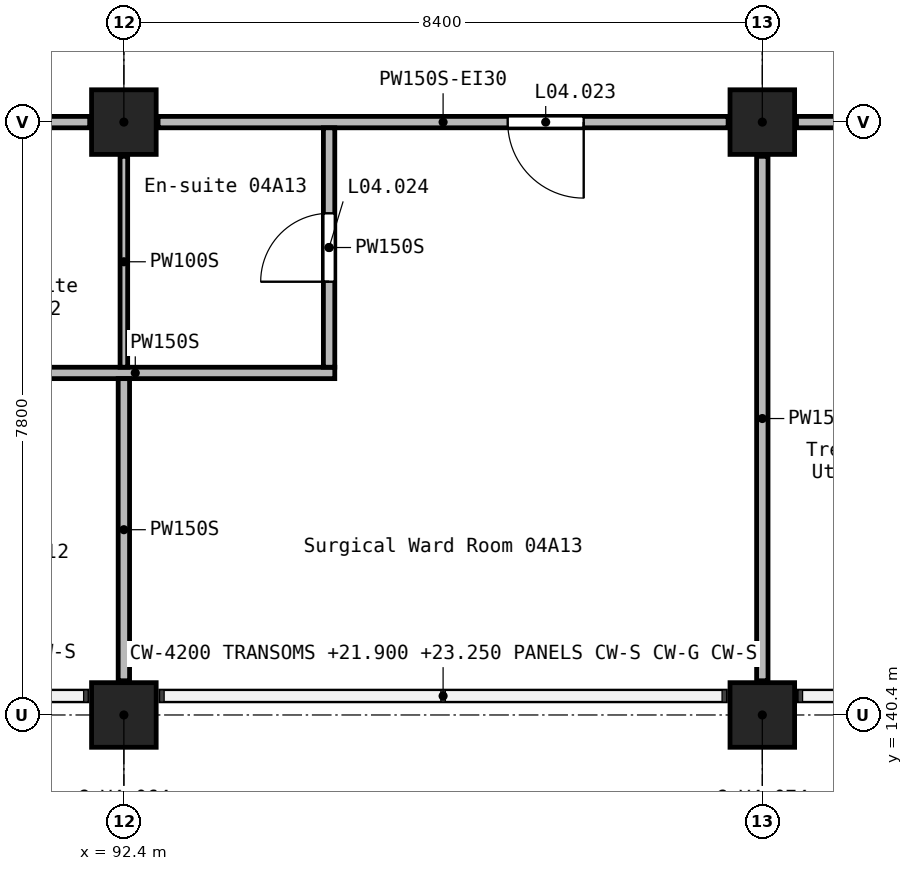
"""IFC4 building model, lengths in metres.
Left out: names, types, materials, properties, quantities, classifications, styles, units other than length and angle.
Written with IfcOpenShell. Run it as: python <this file> out.ifc"""

import sys

from ifc_helpers import new_model, si_unit, direction, frame, frame_2d, origin, origin_2d, place, context, subcontext, project, spatial, rectangle, extrude, element, fill, save


model = new_model("IFC4")
c1 = context("Model", 3, precision=1e-05, world=origin(), true_north=direction((0.0, 1.0)))
c2 = subcontext(c1, "Body", "Model", "MODEL_VIEW")
j1 = project(units=[si_unit("LENGTHUNIT", "METRE"), si_unit("PLANEANGLEUNIT", "RADIAN")], contexts=[c1])
p1 = place(None, origin())
s1 = spatial("IfcSite", under=j1, at=p1, CompositionType="ELEMENT")
p2 = place(p1, origin())
s2 = spatial("IfcBuilding", under=s1, at=p2, CompositionType="ELEMENT")
p3 = place(p2, frame((0.0, 0.0, 21.0)))
s3 = spatial("IfcBuildingStorey", under=s2, at=p3, CompositionType="ELEMENT", Elevation=21.0)
for number, where, z_axis, x_axis in (
    (1, (92.4, 140.4, 0.0), (0.0, 0.0, 1.0), (1.0, 0.0, 0.0)),
    (2, (92.4, 148.2, 0.0), (0.0, 0.0, 1.0), (1.0, 0.0, 0.0)),
    (3, (100.8, 140.4, 0.0), (0.0, 0.0, 1.0), (1.0, 0.0, 0.0)),
    (4, (100.8, 148.2, 0.0), (0.0, 0.0, 1.0), (1.0, 0.0, 0.0)),
):
    element("IfcColumn", number, at=place(p3, frame(where, z_axis=z_axis, x_axis=x_axis)), inside=s3, PredefinedType="COLUMN", context=c2, shape_type="SweptSolid", body=[
        extrude(rectangle(XDim=0.85, YDim=0.85, at=origin_2d()), origin(), (0.0, 0.0, 1.0), 3.9),
    ])
p4 = place(p3, frame((100.35, 148.2, 0.0), z_axis=(0.0, 0.0, 1.0), x_axis=(-1.0, 0.0, 0.0)))
e5 = element("IfcWall", 5, at=p4, inside=s3, PredefinedType="PARTITIONING", context=c2, shape_type="SweptSolid", body=[
    extrude(rectangle(XDim=7.5, YDim=0.15, at=frame_2d((3.75, 0.0))), origin(), (0.0, 0.0, 1.0), 3.6),
])
p5 = place(p4, frame((1.9, 0.0, 0.0)))
e6 = element("IfcOpeningElement", 6, at=p5, cuts=e5, PredefinedType="OPENING", context=c2, shape_type="SweptSolid", body=[
    extrude(rectangle(XDim=1.0, YDim=2.1, at=frame_2d((0.5, 1.05))), frame((0.0, 0.085, 0.0), z_axis=(0.0, -1.0, 0.0), x_axis=(1.0, 0.0, 0.0)), (0.0, 0.0, 1.0), 0.17),
])
p6 = place(p3, frame((91.95, 148.2, 0.0), z_axis=(0.0, 0.0, 1.0), x_axis=(-1.0, 0.0, 0.0)))
e7 = element("IfcWall", 7, at=p6, inside=s3, PredefinedType="PARTITIONING", context=c2, shape_type="SweptSolid", body=[
    extrude(rectangle(XDim=7.5, YDim=0.15, at=frame_2d((3.75, 0.0))), origin(), (0.0, 0.0, 1.0), 3.6),
])
p7 = place(p6, frame((5.6, 0.0, 0.0)))
e8 = element("IfcOpeningElement", 8, at=p7, cuts=e7, PredefinedType="OPENING", context=c2, shape_type="SweptSolid", body=[
    extrude(rectangle(XDim=1.8, YDim=2.1, at=frame_2d((0.9, 1.05))), frame((0.0, 0.085, 0.0), z_axis=(0.0, -1.0, 0.0), x_axis=(1.0, 0.0, 0.0)), (0.0, 0.0, 1.0), 0.17),
])
p8 = place(p6, frame((2.35, 0.0, 0.0)))
e9 = element("IfcOpeningElement", 9, at=p8, cuts=e7, PredefinedType="OPENING", context=c2, shape_type="SweptSolid", body=[
    extrude(rectangle(XDim=1.0, YDim=2.1, at=frame_2d((0.5, 1.05))), frame((0.0, 0.085, 0.0), z_axis=(0.0, -1.0, 0.0), x_axis=(1.0, 0.0, 0.0)), (0.0, 0.0, 1.0), 0.17),
])
p9 = place(p3, frame((101.25, 148.2, 0.0), z_axis=(0.0, 0.0, 1.0), x_axis=(1.0, 0.0, 0.0)))
e10 = element("IfcWall", 10, at=p9, inside=s3, PredefinedType="PARTITIONING", context=c2, shape_type="SweptSolid", body=[
    extrude(rectangle(XDim=3.675, YDim=0.15, at=frame_2d((1.837, 0.0))), origin(), (0.0, 0.0, 1.0), 3.6),
])
p10 = place(p9, frame((1.15, 0.0, 0.0)))
e11 = element("IfcOpeningElement", 11, at=p10, cuts=e10, PredefinedType="OPENING", context=c2, shape_type="SweptSolid", body=[
    extrude(rectangle(XDim=1.0, YDim=2.1, at=frame_2d((0.5, 1.05))), frame((0.0, 0.085, 0.0), z_axis=(0.0, -1.0, 0.0), x_axis=(1.0, 0.0, 0.0)), (0.0, 0.0, 1.0), 0.17),
])
p11 = place(p3, frame((100.8, 140.85, 0.0), z_axis=(0.0, 0.0, 1.0), x_axis=(0.0, 1.0, 0.0)))
e12 = element("IfcWall", 12, at=p11, inside=s3, PredefinedType="PARTITIONING", context=c2, shape_type="SweptSolid", body=[
    extrude(rectangle(XDim=6.9, YDim=0.15, at=frame_2d((3.45, 0.0))), origin(), (0.0, 0.0, 1.0), 3.6),
])
p12 = place(p3, frame((89.925, 144.9, 0.0), z_axis=(0.0, 0.0, 1.0), x_axis=(1.0, 0.0, 0.0)))
e13 = element("IfcWall", 13, at=p12, inside=s3, PredefinedType="PARTITIONING", context=c2, shape_type="SweptSolid", body=[
    extrude(rectangle(XDim=5.25, YDim=0.15, at=frame_2d((2.625, 0.0))), origin(), (0.0, 0.0, 1.0), 3.6),
])
p13 = place(p3, frame((92.4, 140.85, 0.0), z_axis=(0.0, 0.0, 1.0), x_axis=(0.0, 1.0, 0.0)))
e14 = element("IfcWall", 14, at=p13, inside=s3, PredefinedType="PARTITIONING", context=c2, shape_type="SweptSolid", body=[
    extrude(rectangle(XDim=3.975, YDim=0.15, at=frame_2d((1.987, 0.0))), origin(), (0.0, 0.0, 1.0), 3.6),
])
p14 = place(p3, frame((95.1, 144.975, 0.0), z_axis=(0.0, 0.0, 1.0), x_axis=(0.0, 1.0, 0.0)))
e15 = element("IfcWall", 15, at=p14, inside=s3, PredefinedType="PARTITIONING", context=c2, shape_type="SweptSolid", body=[
    extrude(rectangle(XDim=3.15, YDim=0.15, at=frame_2d((1.575, 0.0))), origin(), (0.0, 0.0, 1.0), 3.6),
])
p15 = place(p14, frame((1.125, 0.0, 0.0)))
e16 = element("IfcOpeningElement", 16, at=p15, cuts=e15, PredefinedType="OPENING", context=c2, shape_type="SweptSolid", body=[
    extrude(rectangle(XDim=0.9, YDim=2.1, at=frame_2d((0.45, 1.05))), frame((0.0, 0.085, 0.0), z_axis=(0.0, -1.0, 0.0), x_axis=(1.0, 0.0, 0.0)), (0.0, 0.0, 1.0), 0.17),
])
p16 = place(p3, frame((92.4, 144.975, 0.0), z_axis=(0.0, 0.0, 1.0), x_axis=(0.0, 1.0, 0.0)))
e17 = element("IfcWall", 17, at=p16, inside=s3, PredefinedType="PARTITIONING", context=c2, shape_type="SweptSolid", body=[
    extrude(rectangle(XDim=2.775, YDim=0.1, at=frame_2d((1.387, 0.0))), origin(), (0.0, 0.0, 1.0), 3.6),
])
p17 = place(p5, origin())
e18 = element("IfcDoor", 18, at=p17, inside=s3, OperationType="SINGLE_SWING_LEFT", PredefinedType="DOOR", context=c2, shape_type="SweptSolid", body=[
    extrude(rectangle(XDim=1.0, YDim=2.1, at=frame_2d((0.5, 1.05))), frame((0.0, 0.025, 0.0), z_axis=(0.0, -1.0, 0.0), x_axis=(1.0, 0.0, 0.0)), (0.0, 0.0, 1.0), 0.05),
])
fill(e6, e18)
p18 = place(p15, origin())
e19 = element("IfcDoor", 19, at=p18, inside=s3, OperationType="SINGLE_SWING_RIGHT", PredefinedType="DOOR", context=c2, shape_type="SweptSolid", body=[
    extrude(rectangle(XDim=0.9, YDim=2.1, at=frame_2d((0.45, 1.05))), frame((0.0, 0.025, 0.0), z_axis=(0.0, -1.0, 0.0), x_axis=(1.0, 0.0, 0.0)), (0.0, 0.0, 1.0), 0.05),
])
fill(e16, e19)
save(model, sys.argv[1])
